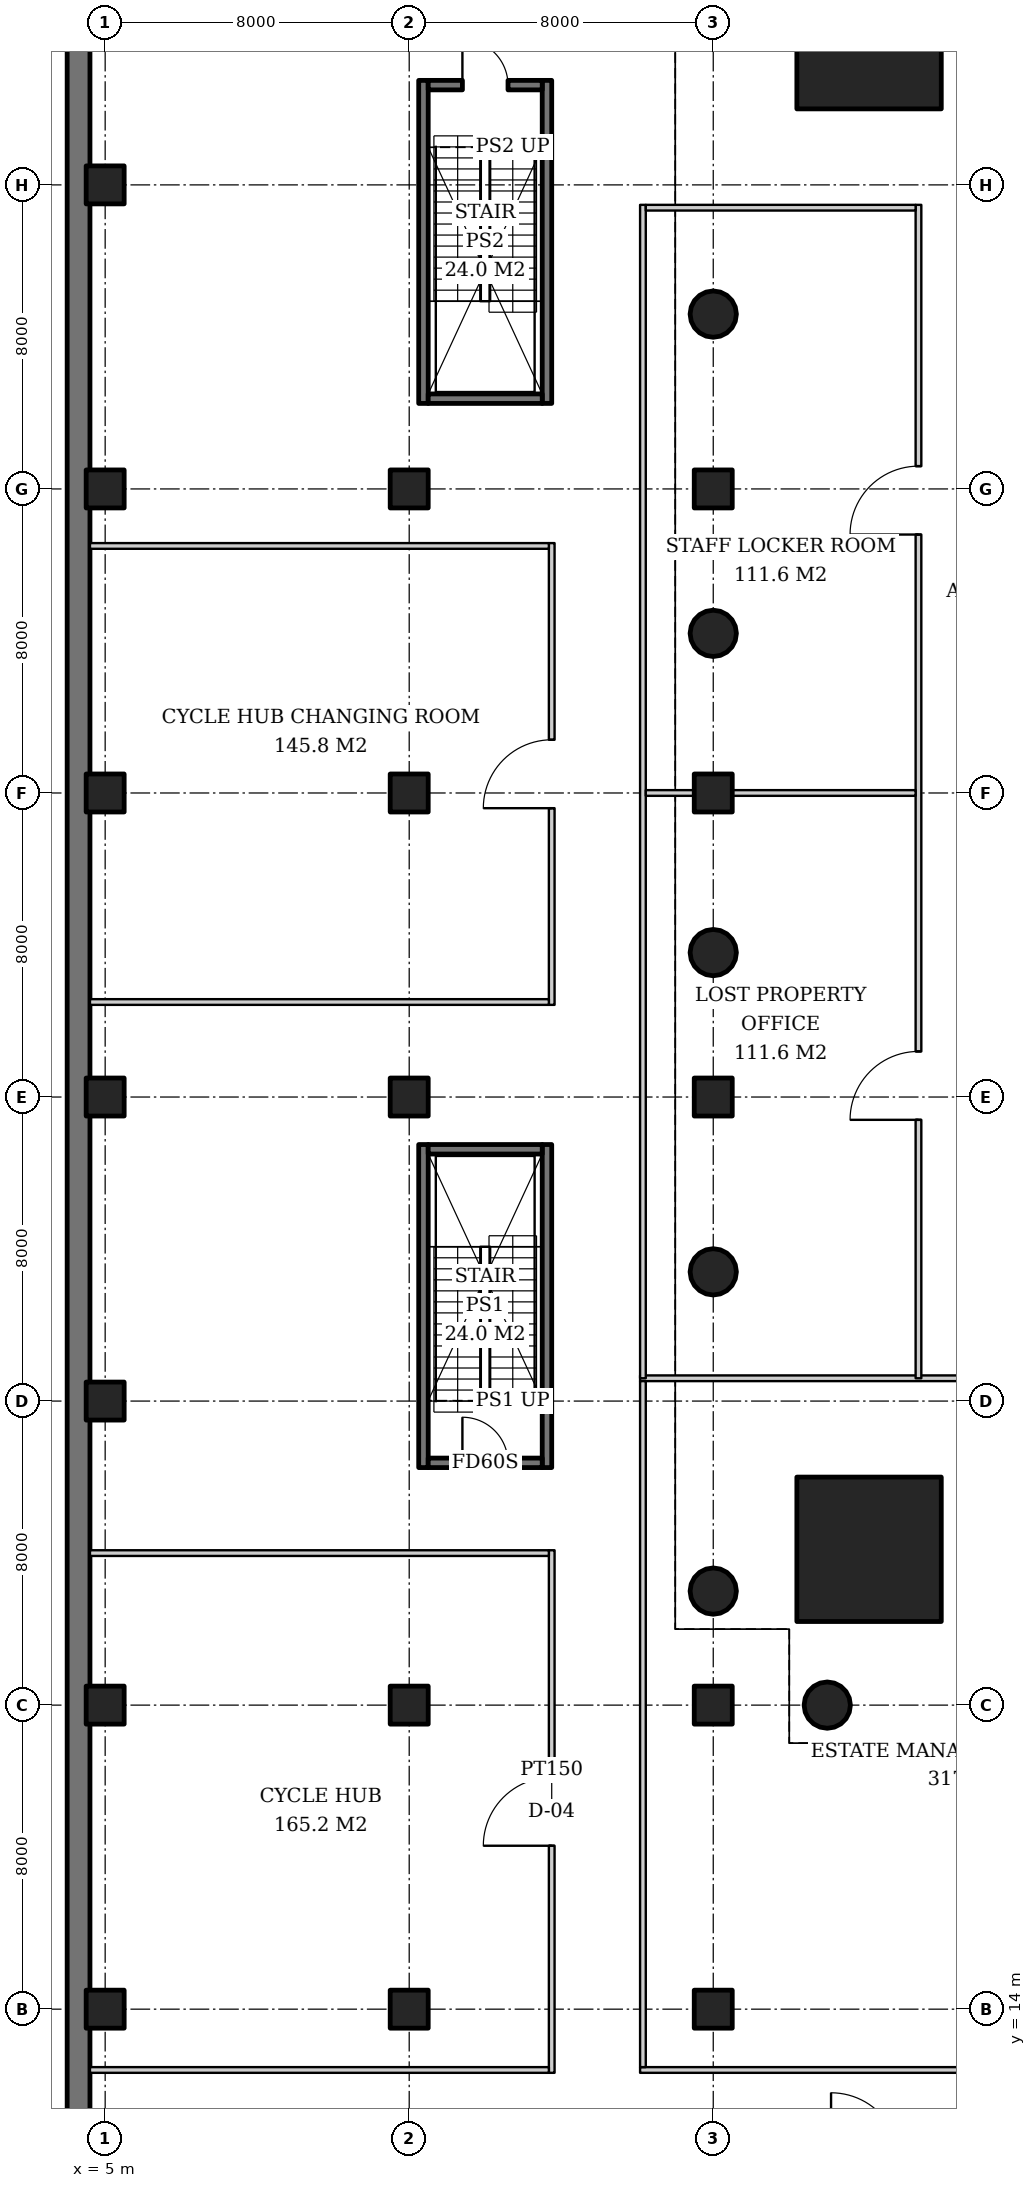
"""IFC4 building model, lengths in metres.
Left out: names, types, materials, properties, quantities, classifications, styles, units other than length and angle.
Written with IfcOpenShell. Run it as: python <this file> out.ifc"""

import sys

from ifc_helpers import new_model, si_unit, direction, frame, frame_2d, origin, origin_2d, place, context, subcontext, project, spatial, rectangle, hollow_circle, extrude, element, fill, save


model = new_model("IFC4")
c1 = context("Model", 3, precision=1e-05, world=origin(), true_north=direction((0.0, 1.0)))
c2 = subcontext(c1, "Body", "Model", "MODEL_VIEW")
j1 = project(units=[si_unit("LENGTHUNIT", "METRE"), si_unit("PLANEANGLEUNIT", "RADIAN")], contexts=[c1])
p1 = place(None, origin())
s1 = spatial("IfcSite", under=j1, at=p1, CompositionType="ELEMENT")
p2 = place(p1, origin())
s2 = spatial("IfcBuilding", under=s1, at=p2, CompositionType="ELEMENT")
p3 = place(p2, frame((0.0, 0.0, -5.0)))
s3 = spatial("IfcBuildingStorey", under=s2, at=p3, CompositionType="ELEMENT", Elevation=-5.0)
for number, where, z_axis, x_axis in (
    (1, (5.0, 14.0, 0.0), (0.0, 0.0, 1.0), (1.0, 0.0, 0.0)),
    (2, (5.0, 22.0, 0.0), (0.0, 0.0, 1.0), (1.0, 0.0, 0.0)),
    (3, (5.0, 30.0, 0.0), (0.0, 0.0, 1.0), (1.0, 0.0, 0.0)),
    (4, (5.0, 38.0, 0.0), (0.0, 0.0, 1.0), (1.0, 0.0, 0.0)),
    (5, (5.0, 46.0, 0.0), (0.0, 0.0, 1.0), (1.0, 0.0, 0.0)),
    (6, (5.0, 54.0, 0.0), (0.0, 0.0, 1.0), (1.0, 0.0, 0.0)),
    (7, (5.0, 62.0, 0.0), (0.0, 0.0, 1.0), (1.0, 0.0, 0.0)),
    (8, (13.0, 14.0, 0.0), (0.0, 0.0, 1.0), (1.0, 0.0, 0.0)),
    (9, (13.0, 22.0, 0.0), (0.0, 0.0, 1.0), (1.0, 0.0, 0.0)),
    (10, (13.0, 38.0, 0.0), (0.0, 0.0, 1.0), (1.0, 0.0, 0.0)),
    (11, (13.0, 46.0, 0.0), (0.0, 0.0, 1.0), (1.0, 0.0, 0.0)),
    (12, (13.0, 54.0, 0.0), (0.0, 0.0, 1.0), (1.0, 0.0, 0.0)),
    (13, (21.0, 14.0, 0.0), (0.0, 0.0, 1.0), (1.0, 0.0, 0.0)),
):
    element("IfcColumn", number, at=place(p3, frame(where, z_axis=z_axis, x_axis=x_axis)), inside=s3, PredefinedType="COLUMN", context=c2, shape_type="SweptSolid", body=[
        extrude(rectangle(XDim=1.0, YDim=1.0, at=origin_2d()), origin(), (0.0, 0.0, 1.0), 5.0),
    ])
p4 = place(p3, frame((4.3, 5.6, 0.0), z_axis=(0.0, 0.0, 1.0), x_axis=(0.0, 1.0, 0.0)))
e14 = element("IfcWall", 14, at=p4, inside=s3, PredefinedType="USERDEFINED", context=c2, shape_type="SweptSolid", body=[
    extrude(rectangle(XDim=88.8, YDim=0.6, at=frame_2d((44.4, 0.0))), origin(), (0.0, 0.0, 1.0), 5.0),
])
for number, where, z_axis, x_axis in (
    (15, (25.1, 65.9, 0.0), (0.0, 0.0, 1.0), (1.0, 0.0, 0.0)),
    (16, (25.1, 26.1, 0.0), (0.0, 0.0, 1.0), (1.0, 0.0, 0.0)),
):
    element("IfcColumn", number, at=place(p3, frame(where, z_axis=z_axis, x_axis=x_axis)), inside=s3, PredefinedType="COLUMN", context=c2, shape_type="SweptSolid", body=[
        extrude(rectangle(XDim=3.8, YDim=3.8, at=origin_2d()), origin(), (0.0, 0.0, 1.0), 5.0),
    ])
for number, where, z_axis, x_axis in (
    (17, (21.0, 25.0, 0.0), (0.0, 0.0, 1.0), (1.0, 0.0, 0.0)),
    (18, (21.0, 58.6, 0.0), (0.0, 0.0, 1.0), (1.0, 0.0, 0.0)),
    (19, (21.0, 50.2, 0.0), (0.0, 0.0, 1.0), (1.0, 0.0, 0.0)),
    (20, (21.0, 41.8, 0.0), (0.0, 0.0, 1.0), (1.0, 0.0, 0.0)),
    (21, (21.0, 33.4, 0.0), (0.0, 0.0, 1.0), (1.0, 0.0, 0.0)),
    (22, (24.0, 22.0, 0.0), (0.0, 0.0, 1.0), (1.0, 0.0, 0.0)),
):
    element("IfcColumn", number, at=place(p3, frame(where, z_axis=z_axis, x_axis=x_axis)), inside=s3, PredefinedType="COLUMN", context=c2, shape_type="SweptSolid", body=[
        extrude(hollow_circle(Radius=0.61, WallThickness=0.04, at=origin_2d()), origin(), (0.0, 0.0, 1.0), 5.0),
    ])
for number, where, z_axis, x_axis in (
    (23, (21.0, 22.0, 0.0), (0.0, 0.0, 1.0), (1.0, 0.0, 0.0)),
    (24, (21.0, 38.0, 0.0), (0.0, 0.0, 1.0), (1.0, 0.0, 0.0)),
    (25, (21.0, 46.0, 0.0), (0.0, 0.0, 1.0), (1.0, 0.0, 0.0)),
    (26, (21.0, 54.0, 0.0), (0.0, 0.0, 1.0), (1.0, 0.0, 0.0)),
):
    element("IfcColumn", number, at=place(p3, frame(where, z_axis=z_axis, x_axis=x_axis)), inside=s3, PredefinedType="COLUMN", context=c2, shape_type="SweptSolid", body=[
        extrude(rectangle(XDim=1.0, YDim=1.0, at=origin_2d()), origin(), (0.0, 0.0, 1.0), 5.0),
    ])
for number, where, z_axis, x_axis in (
    (27, (13.375, 28.25, 0.0), (0.0, 0.0, 1.0), (0.0, 1.0, 0.0)),
    (28, (16.625, 28.25, 0.0), (0.0, 0.0, 1.0), (0.0, 1.0, 0.0)),
):
    element("IfcWall", number, at=place(p3, frame(where, z_axis=z_axis, x_axis=x_axis)), inside=s3, PredefinedType="SOLIDWALL", context=c2, shape_type="SweptSolid", body=[
        extrude(rectangle(XDim=8.5, YDim=0.25, at=frame_2d((4.25, 0.0))), origin(), (0.0, 0.0, 1.0), 4.6),
    ])
p5 = place(p3, frame((13.5, 28.375, 0.0), z_axis=(0.0, 0.0, 1.0), x_axis=(1.0, 0.0, 0.0)))
e29 = element("IfcWall", 29, at=p5, inside=s3, PredefinedType="SOLIDWALL", context=c2, shape_type="SweptSolid", body=[
    extrude(rectangle(XDim=3.0, YDim=0.25, at=frame_2d((1.5, 0.0))), origin(), (0.0, 0.0, 1.0), 4.6),
])
p6 = place(p5, frame((0.9, 0.0, 0.0)))
e30 = element("IfcOpeningElement", 30, at=p6, cuts=e29, PredefinedType="OPENING", context=c2, shape_type="SweptSolid", body=[
    extrude(rectangle(XDim=1.2, YDim=2.1, at=frame_2d((0.6, 1.05))), frame((0.0, 0.135, 0.0), z_axis=(0.0, -1.0, 0.0), x_axis=(1.0, 0.0, 0.0)), (0.0, 0.0, 1.0), 0.27),
])
p7 = place(p3, frame((13.5, 36.625, 0.0), z_axis=(0.0, 0.0, 1.0), x_axis=(1.0, 0.0, 0.0)))
e31 = element("IfcWall", 31, at=p7, inside=s3, PredefinedType="SOLIDWALL", context=c2, shape_type="SweptSolid", body=[
    extrude(rectangle(XDim=3.0, YDim=0.25, at=frame_2d((1.5, 0.0))), origin(), (0.0, 0.0, 1.0), 4.6),
])
for number, where, z_axis, x_axis in (
    (32, (13.375, 56.25, 0.0), (0.0, 0.0, 1.0), (0.0, 1.0, 0.0)),
    (33, (16.625, 56.25, 0.0), (0.0, 0.0, 1.0), (0.0, 1.0, 0.0)),
):
    element("IfcWall", number, at=place(p3, frame(where, z_axis=z_axis, x_axis=x_axis)), inside=s3, PredefinedType="SOLIDWALL", context=c2, shape_type="SweptSolid", body=[
        extrude(rectangle(XDim=8.5, YDim=0.25, at=frame_2d((4.25, 0.0))), origin(), (0.0, 0.0, 1.0), 4.6),
    ])
p8 = place(p3, frame((13.5, 56.375, 0.0), z_axis=(0.0, 0.0, 1.0), x_axis=(1.0, 0.0, 0.0)))
e34 = element("IfcWall", 34, at=p8, inside=s3, PredefinedType="SOLIDWALL", context=c2, shape_type="SweptSolid", body=[
    extrude(rectangle(XDim=3.0, YDim=0.25, at=frame_2d((1.5, 0.0))), origin(), (0.0, 0.0, 1.0), 4.6),
])
p9 = place(p3, frame((13.5, 64.625, 0.0), z_axis=(0.0, 0.0, 1.0), x_axis=(1.0, 0.0, 0.0)))
e35 = element("IfcWall", 35, at=p9, inside=s3, PredefinedType="SOLIDWALL", context=c2, shape_type="SweptSolid", body=[
    extrude(rectangle(XDim=3.0, YDim=0.25, at=frame_2d((1.5, 0.0))), origin(), (0.0, 0.0, 1.0), 4.6),
])
p10 = place(p9, frame((0.9, 0.0, 0.0)))
e36 = element("IfcOpeningElement", 36, at=p10, cuts=e35, PredefinedType="OPENING", context=c2, shape_type="SweptSolid", body=[
    extrude(rectangle(XDim=1.2, YDim=2.1, at=frame_2d((0.6, 1.05))), frame((0.0, 0.135, 0.0), z_axis=(0.0, -1.0, 0.0), x_axis=(1.0, 0.0, 0.0)), (0.0, 0.0, 1.0), 0.27),
])
p11 = place(p3, frame((16.75, 12.325, 0.0), z_axis=(0.0, 0.0, 1.0), x_axis=(0.0, 1.0, 0.0)))
e37 = element("IfcWall", 37, at=p11, inside=s3, PredefinedType="PARTITIONING", context=c2, shape_type="SweptSolid", body=[
    extrude(rectangle(XDim=13.75, YDim=0.15, at=frame_2d((6.875, 0.0))), origin(), (0.0, 0.0, 1.0), 4.6),
])
p12 = place(p11, frame((5.975, 0.0, 0.0)))
e38 = element("IfcOpeningElement", 38, at=p12, cuts=e37, PredefinedType="OPENING", context=c2, shape_type="SweptSolid", body=[
    extrude(rectangle(XDim=1.8, YDim=2.4, at=frame_2d((0.9, 1.2))), frame((0.0, 0.085, 0.0), z_axis=(0.0, -1.0, 0.0), x_axis=(1.0, 0.0, 0.0)), (0.0, 0.0, 1.0), 0.17),
])
for number, where, z_axis, x_axis in (
    (39, (4.6, 12.4, 0.0), (0.0, 0.0, 1.0), (1.0, 0.0, 0.0)),
    (40, (4.6, 26.0, 0.0), (0.0, 0.0, 1.0), (1.0, 0.0, 0.0)),
):
    element("IfcWall", number, at=place(p3, frame(where, z_axis=z_axis, x_axis=x_axis)), inside=s3, PredefinedType="PARTITIONING", context=c2, shape_type="SweptSolid", body=[
        extrude(rectangle(XDim=12.075, YDim=0.15, at=frame_2d((6.038, 0.0))), origin(), (0.0, 0.0, 1.0), 4.6),
    ])
p13 = place(p3, frame((16.75, 40.425, 0.0), z_axis=(0.0, 0.0, 1.0), x_axis=(0.0, 1.0, 0.0)))
e41 = element("IfcWall", 41, at=p13, inside=s3, PredefinedType="PARTITIONING", context=c2, shape_type="SweptSolid", body=[
    extrude(rectangle(XDim=12.15, YDim=0.15, at=frame_2d((6.075, 0.0))), origin(), (0.0, 0.0, 1.0), 4.6),
])
p14 = place(p13, frame((5.175, 0.0, 0.0)))
e42 = element("IfcOpeningElement", 42, at=p14, cuts=e41, PredefinedType="OPENING", context=c2, shape_type="SweptSolid", body=[
    extrude(rectangle(XDim=1.8, YDim=2.4, at=frame_2d((0.9, 1.2))), frame((0.0, 0.085, 0.0), z_axis=(0.0, -1.0, 0.0), x_axis=(1.0, 0.0, 0.0)), (0.0, 0.0, 1.0), 0.17),
])
for number, where, z_axis, x_axis in (
    (43, (4.6, 40.5, 0.0), (0.0, 0.0, 1.0), (1.0, 0.0, 0.0)),
    (44, (4.6, 52.5, 0.0), (0.0, 0.0, 1.0), (1.0, 0.0, 0.0)),
):
    element("IfcWall", number, at=place(p3, frame(where, z_axis=z_axis, x_axis=x_axis)), inside=s3, PredefinedType="PARTITIONING", context=c2, shape_type="SweptSolid", body=[
        extrude(rectangle(XDim=12.075, YDim=0.15, at=frame_2d((6.038, 0.0))), origin(), (0.0, 0.0, 1.0), 4.6),
    ])
p15 = place(p3, frame((19.075, 12.4, 0.0), z_axis=(0.0, 0.0, 1.0), x_axis=(1.0, 0.0, 0.0)))
e45 = element("IfcWall", 45, at=p15, inside=s3, PredefinedType="PARTITIONING", context=c2, shape_type="SweptSolid", body=[
    extrude(rectangle(XDim=52.5, YDim=0.15, at=frame_2d((26.25, 0.0))), origin(), (0.0, 0.0, 1.0), 4.6),
])
p16 = place(p3, frame((19.075, 30.6, 0.0), z_axis=(0.0, 0.0, 1.0), x_axis=(1.0, 0.0, 0.0)))
e46 = element("IfcWall", 46, at=p16, inside=s3, PredefinedType="PARTITIONING", context=c2, shape_type="SweptSolid", body=[
    extrude(rectangle(XDim=52.5, YDim=0.15, at=frame_2d((26.25, 0.0))), origin(), (0.0, 0.0, 1.0), 3.688),
])
p17 = place(p16, frame((11.045, 0.0, 0.0)))
e47 = element("IfcOpeningElement", 47, at=p17, cuts=e46, PredefinedType="OPENING", context=c2, shape_type="SweptSolid", body=[
    extrude(rectangle(XDim=1.8, YDim=2.4, at=frame_2d((0.9, 1.2))), frame((0.0, 0.085, 0.0), z_axis=(0.0, -1.0, 0.0), x_axis=(1.0, 0.0, 0.0)), (0.0, 0.0, 1.0), 0.17),
])
p18 = place(p16, frame((21.225, 0.0, 0.0)))
e48 = element("IfcOpeningElement", 48, at=p18, cuts=e46, PredefinedType="OPENING", context=c2, shape_type="SweptSolid", body=[
    extrude(rectangle(XDim=1.0, YDim=2.1, at=frame_2d((0.5, 1.05))), frame((0.0, 0.085, 0.0), z_axis=(0.0, -1.0, 0.0), x_axis=(1.0, 0.0, 0.0)), (0.0, 0.0, 1.0), 0.17),
])
p19 = place(p16, frame((29.225, 0.0, 0.0)))
e49 = element("IfcOpeningElement", 49, at=p19, cuts=e46, PredefinedType="OPENING", context=c2, shape_type="SweptSolid", body=[
    extrude(rectangle(XDim=1.8, YDim=2.4, at=frame_2d((0.9, 1.2))), frame((0.0, 0.085, 0.0), z_axis=(0.0, -1.0, 0.0), x_axis=(1.0, 0.0, 0.0)), (0.0, 0.0, 1.0), 0.17),
])
p20 = place(p16, frame((39.005, 0.0, 0.0)))
e50 = element("IfcOpeningElement", 50, at=p20, cuts=e46, PredefinedType="OPENING", context=c2, shape_type="SweptSolid", body=[
    extrude(rectangle(XDim=1.8, YDim=2.4, at=frame_2d((0.9, 1.2))), frame((0.0, 0.085, 0.0), z_axis=(0.0, -1.0, 0.0), x_axis=(1.0, 0.0, 0.0)), (0.0, 0.0, 1.0), 0.17),
])
p21 = place(p3, frame((19.15, 12.475, 0.0), z_axis=(0.0, 0.0, 1.0), x_axis=(0.0, 1.0, 0.0)))
e51 = element("IfcWall", 51, at=p21, inside=s3, PredefinedType="PARTITIONING", context=c2, shape_type="SweptSolid", body=[
    extrude(rectangle(XDim=18.05, YDim=0.15, at=frame_2d((9.025, 0.0))), origin(), (0.0, 0.0, 1.0), 4.6),
])
p22 = place(p3, frame((19.15, 30.6, 0.0), z_axis=(0.0, 0.0, 1.0), x_axis=(0.0, 1.0, 0.0)))
e52 = element("IfcWall", 52, at=p22, inside=s3, PredefinedType="PARTITIONING", context=c2, shape_type="SweptSolid", body=[
    extrude(rectangle(XDim=30.875, YDim=0.15, at=frame_2d((15.438, 0.0))), origin(), (0.0, 0.0, 1.0), 4.6),
])
p23 = place(p3, frame((26.4, 30.6, 0.0), z_axis=(0.0, 0.0, 1.0), x_axis=(0.0, 1.0, 0.0)))
e53 = element("IfcWall", 53, at=p23, inside=s3, PredefinedType="PARTITIONING", context=c2, shape_type="SweptSolid", body=[
    extrude(rectangle(XDim=30.875, YDim=0.15, at=frame_2d((15.438, 0.0))), origin(), (0.0, 0.0, 1.0), 3.688),
])
p24 = place(p23, frame((6.8, 0.0, 0.0)))
e54 = element("IfcOpeningElement", 54, at=p24, cuts=e53, PredefinedType="OPENING", context=c2, shape_type="SweptSolid", body=[
    extrude(rectangle(XDim=1.8, YDim=2.4, at=frame_2d((0.9, 1.2))), frame((0.0, 0.085, 0.0), z_axis=(0.0, -1.0, 0.0), x_axis=(1.0, 0.0, 0.0)), (0.0, 0.0, 1.0), 0.17),
])
p25 = place(p23, frame((22.2, 0.0, 0.0)))
e55 = element("IfcOpeningElement", 55, at=p25, cuts=e53, PredefinedType="OPENING", context=c2, shape_type="SweptSolid", body=[
    extrude(rectangle(XDim=1.8, YDim=2.4, at=frame_2d((0.9, 1.2))), frame((0.0, 0.085, 0.0), z_axis=(0.0, -1.0, 0.0), x_axis=(1.0, 0.0, 0.0)), (0.0, 0.0, 1.0), 0.17),
])
p26 = place(p3, frame((19.225, 61.4, 0.0), z_axis=(0.0, 0.0, 1.0), x_axis=(1.0, 0.0, 0.0)))
e56 = element("IfcWall", 56, at=p26, inside=s3, PredefinedType="PARTITIONING", context=c2, shape_type="SweptSolid", body=[
    extrude(rectangle(XDim=7.1, YDim=0.15, at=frame_2d((3.55, 0.0))), origin(), (0.0, 0.0, 1.0), 4.1),
])
p27 = place(p3, frame((19.225, 46.0, 0.0), z_axis=(0.0, 0.0, 1.0), x_axis=(1.0, 0.0, 0.0)))
e57 = element("IfcWall", 57, at=p27, inside=s3, PredefinedType="PARTITIONING", context=c2, shape_type="SweptSolid", body=[
    extrude(rectangle(XDim=1.275, YDim=0.15, at=frame_2d((0.637, 0.0))), origin(), (0.0, 0.0, 1.0), 4.6),
])
p28 = place(p3, frame((21.5, 46.0, 0.0), z_axis=(0.0, 0.0, 1.0), x_axis=(1.0, 0.0, 0.0)))
e58 = element("IfcWall", 58, at=p28, inside=s3, PredefinedType="PARTITIONING", context=c2, shape_type="SweptSolid", body=[
    extrude(rectangle(XDim=4.825, YDim=0.15, at=frame_2d((2.413, 0.0))), origin(), (0.0, 0.0, 1.0), 4.7),
])
p29 = place(p6, origin())
e59 = element("IfcDoor", 59, at=p29, inside=s3, OperationType="SINGLE_SWING_LEFT", PredefinedType="DOOR", context=c2, shape_type="SweptSolid", body=[
    extrude(rectangle(XDim=1.2, YDim=2.1, at=frame_2d((0.6, 1.05))), frame((0.0, 0.025, 0.0), z_axis=(0.0, -1.0, 0.0), x_axis=(1.0, 0.0, 0.0)), (0.0, 0.0, 1.0), 0.05),
])
fill(e30, e59)
p30 = place(p10, origin())
e60 = element("IfcDoor", 60, at=p30, inside=s3, OperationType="SINGLE_SWING_LEFT", PredefinedType="DOOR", context=c2, shape_type="SweptSolid", body=[
    extrude(rectangle(XDim=1.2, YDim=2.1, at=frame_2d((0.6, 1.05))), frame((0.0, 0.025, 0.0), z_axis=(0.0, -1.0, 0.0), x_axis=(1.0, 0.0, 0.0)), (0.0, 0.0, 1.0), 0.05),
])
fill(e36, e60)
p31 = place(p12, origin())
e61 = element("IfcDoor", 61, at=p31, inside=s3, OperationType="DOUBLE_DOOR_SINGLE_SWING", PredefinedType="DOOR", context=c2, shape_type="SweptSolid", body=[
    extrude(rectangle(XDim=1.8, YDim=2.4, at=frame_2d((0.9, 1.2))), frame((0.0, 0.025, 0.0), z_axis=(0.0, -1.0, 0.0), x_axis=(1.0, 0.0, 0.0)), (0.0, 0.0, 1.0), 0.05),
])
fill(e38, e61)
p32 = place(p14, origin())
e62 = element("IfcDoor", 62, at=p32, inside=s3, OperationType="DOUBLE_DOOR_SINGLE_SWING", PredefinedType="DOOR", context=c2, shape_type="SweptSolid", body=[
    extrude(rectangle(XDim=1.8, YDim=2.4, at=frame_2d((0.9, 1.2))), frame((0.0, 0.025, 0.0), z_axis=(0.0, -1.0, 0.0), x_axis=(1.0, 0.0, 0.0)), (0.0, 0.0, 1.0), 0.05),
])
fill(e42, e62)
p33 = place(p24, origin())
e63 = element("IfcDoor", 63, at=p33, inside=s3, OperationType="DOUBLE_DOOR_SINGLE_SWING", PredefinedType="DOOR", context=c2, shape_type="SweptSolid", body=[
    extrude(rectangle(XDim=1.8, YDim=2.4, at=frame_2d((0.9, 1.2))), frame((0.0, 0.025, 0.0), z_axis=(0.0, -1.0, 0.0), x_axis=(1.0, 0.0, 0.0)), (0.0, 0.0, 1.0), 0.05),
])
fill(e54, e63)
p34 = place(p25, origin())
e64 = element("IfcDoor", 64, at=p34, inside=s3, OperationType="DOUBLE_DOOR_SINGLE_SWING", PredefinedType="DOOR", context=c2, shape_type="SweptSolid", body=[
    extrude(rectangle(XDim=1.8, YDim=2.4, at=frame_2d((0.9, 1.2))), frame((0.0, 0.025, 0.0), z_axis=(0.0, -1.0, 0.0), x_axis=(1.0, 0.0, 0.0)), (0.0, 0.0, 1.0), 0.05),
])
fill(e55, e64)
save(model, sys.argv[1])
